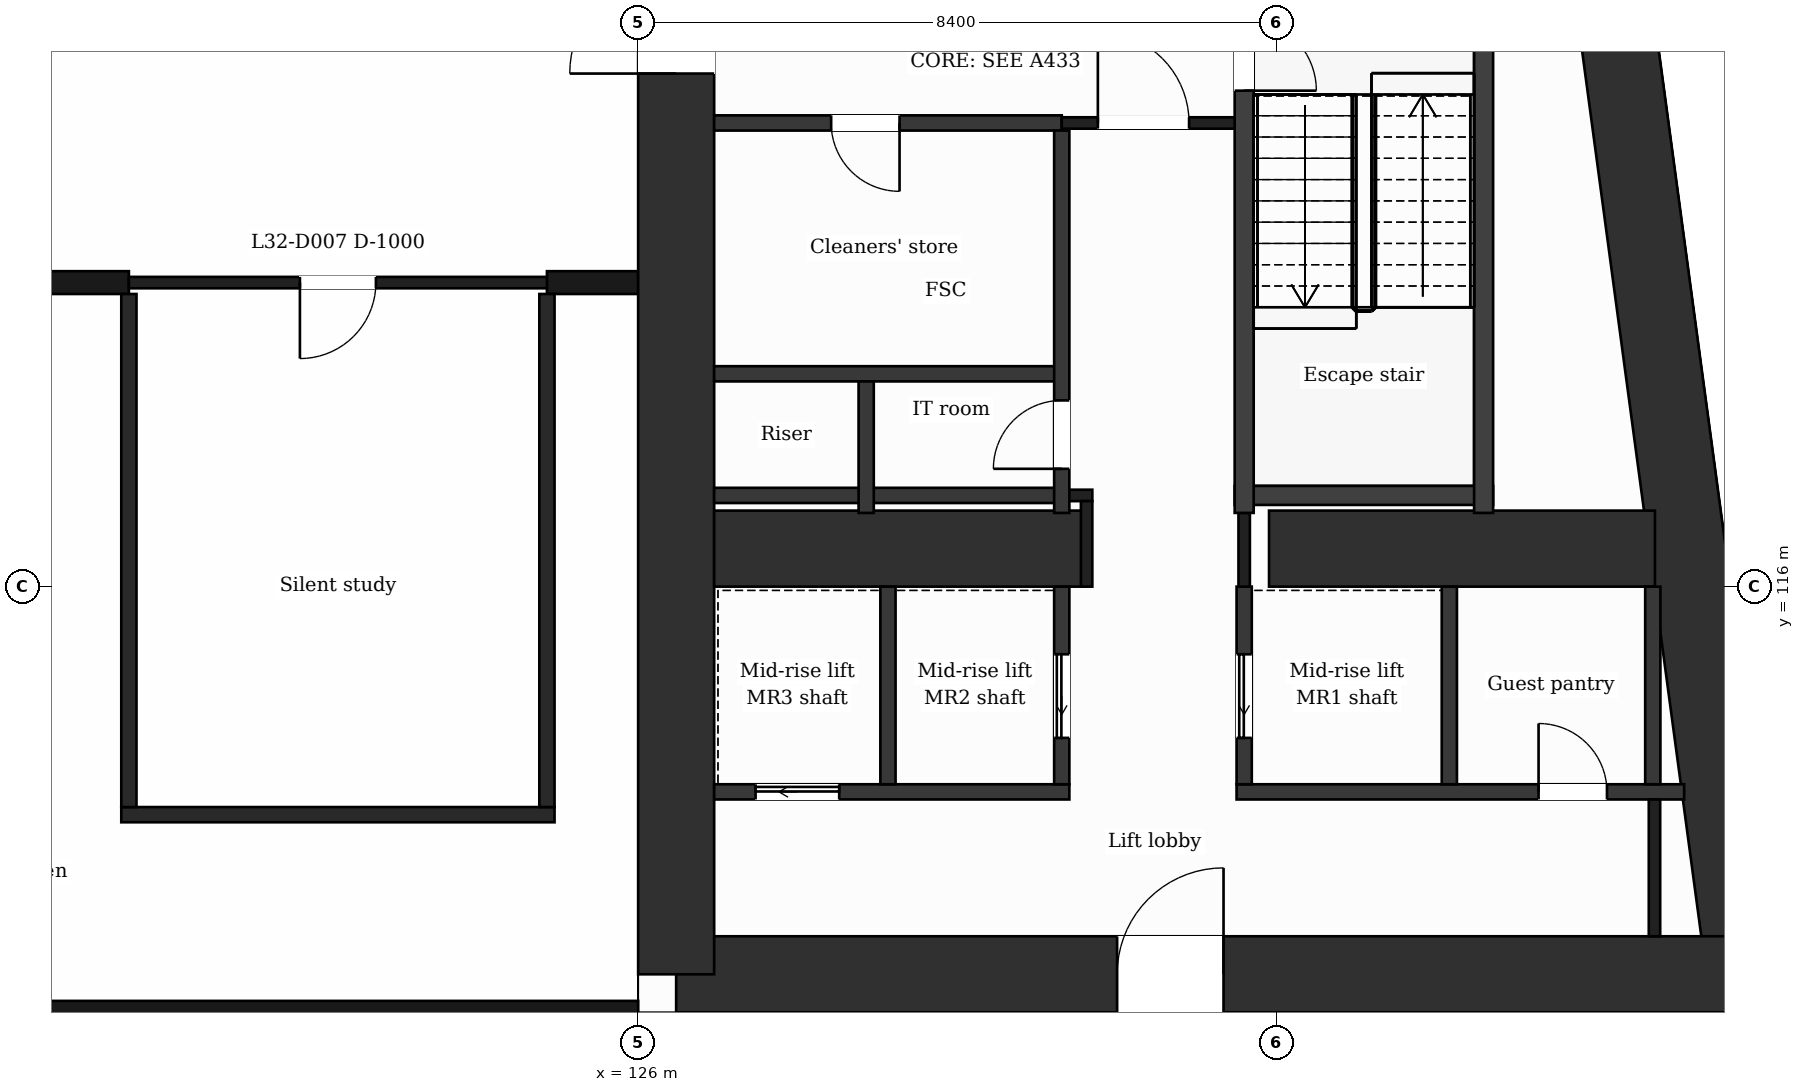
"""IFC4 building model, lengths in metres.
Left out: names, types, materials, properties, quantities, classifications, styles, units other than length and angle.
Written with IfcOpenShell. Run it as: python <this file> out.ifc"""

import sys

from ifc_helpers import new_model, si_unit, direction, frame, frame_2d, origin, place, context, subcontext, project, spatial, rectangle, extrude, element, fill, save


model = new_model("IFC4")
c1 = context("Model", 3, precision=1e-05, world=origin(), true_north=direction((0.0, 1.0)))
c2 = subcontext(c1, "Body", "Model", "MODEL_VIEW")
j1 = project(units=[si_unit("LENGTHUNIT", "METRE"), si_unit("PLANEANGLEUNIT", "RADIAN")], contexts=[c1])
p1 = place(None, origin())
s1 = spatial("IfcSite", under=j1, at=p1, CompositionType="ELEMENT")
p2 = place(p1, origin())
s2 = spatial("IfcBuilding", under=s1, at=p2, CompositionType="ELEMENT")
p3 = place(p2, frame((0.0, 0.0, 135.4)))
s3 = spatial("IfcBuildingStorey", under=s2, at=p3, CompositionType="ELEMENT", Elevation=135.4)
p4 = place(p3, frame((137.732, 131.9, 0.0), z_axis=(0.0, 0.0, 1.0), x_axis=(0.133411141623, -0.991060778808, 0.0)))
e1 = element("IfcWall", 1, at=p4, inside=s3, PredefinedType="SHEAR", context=c2, shape_type="SweptSolid", body=[
    extrude(rectangle(XDim=21.189, YDim=1.0, at=frame_2d((10.595, 0.0))), origin(), (0.0, 0.0, 1.0), 7.4),
])
p5 = place(p3, frame((140.559, 110.9, 0.0), z_axis=(0.0, 0.0, 1.0), x_axis=(-1.0, 0.0, 0.0)))
e2 = element("IfcWall", 2, at=p5, inside=s3, PredefinedType="SHEAR", context=c2, shape_type="SweptSolid", body=[
    extrude(rectangle(XDim=14.059, YDim=1.0, at=frame_2d((7.029, 0.0))), origin(), (0.0, 0.0, 1.0), 7.4),
])
p6 = place(p5, frame((6.858, 0.0, 0.0)))
e3 = element("IfcOpeningElement", 3, at=p6, cuts=e2, PredefinedType="OPENING", context=c2, shape_type="SweptSolid", body=[
    extrude(rectangle(XDim=1.4, YDim=2.1, at=frame_2d((0.7, 1.05))), frame((0.0, 0.51, 0.0), z_axis=(0.0, -1.0, 0.0), x_axis=(1.0, 0.0, 0.0)), (0.0, 0.0, 1.0), 1.02),
])
p7 = place(p3, frame((126.5, 110.9, 0.0), z_axis=(0.0, 0.0, 1.0), x_axis=(0.0, 1.0, 0.0)))
e4 = element("IfcWall", 4, at=p7, inside=s3, PredefinedType="SHEAR", context=c2, shape_type="SweptSolid", body=[
    extrude(rectangle(XDim=21.0, YDim=1.0, at=frame_2d((10.5, 0.0))), origin(), (0.0, 0.0, 1.0), 7.4),
])
p8 = place(p7, frame((11.85, 0.0, 0.0)))
e5 = element("IfcOpeningElement", 5, at=p8, cuts=e4, PredefinedType="OPENING", context=c2, shape_type="SweptSolid", body=[
    extrude(rectangle(XDim=1.4, YDim=2.1, at=frame_2d((0.7, 1.05))), frame((0.0, 0.51, 0.0), z_axis=(0.0, -1.0, 0.0), x_axis=(1.0, 0.0, 0.0)), (0.0, 0.0, 1.0), 1.02),
])
p9 = place(p3, frame((127.0, 116.5, 0.0), z_axis=(0.0, 0.0, 1.0), x_axis=(1.0, 0.0, 0.0)))
e6 = element("IfcWall", 6, at=p9, inside=s3, PredefinedType="SHEAR", context=c2, shape_type="SweptSolid", body=[
    extrude(rectangle(XDim=4.9, YDim=1.0, at=frame_2d((2.45, 0.0))), origin(), (0.0, 0.0, 1.0), 7.4),
])
p10 = place(p3, frame((134.3, 116.5, 0.0), z_axis=(0.0, 0.0, 1.0), x_axis=(1.0, 0.0, 0.0)))
e7 = element("IfcWall", 7, at=p10, inside=s3, PredefinedType="SHEAR", context=c2, shape_type="SweptSolid", body=[
    extrude(rectangle(XDim=5.077, YDim=1.0, at=frame_2d((2.539, 0.0))), origin(), (0.0, 0.0, 1.0), 7.4),
])
p11 = place(p3, frame((100.8, 110.4, 0.0), z_axis=(0.0, 0.0, 1.0), x_axis=(1.0, 0.0, 0.0)))
e8 = element("IfcWall", 8, at=p11, inside=s3, PredefinedType="PARTITIONING", context=c2, shape_type="SweptSolid", body=[
    extrude(rectangle(XDim=25.2, YDim=0.3, at=frame_2d((12.6, 0.0))), origin(), (0.0, 0.0, 1.0), 1.0),
])
p12 = place(p3, frame((119.2, 113.0, 0.0), z_axis=(0.0, 0.0, 1.0), x_axis=(1.0, 0.0, 0.0)))
e9 = element("IfcWall", 9, at=p12, inside=s3, PredefinedType="PARTITIONING", context=c2, shape_type="SweptSolid", body=[
    extrude(rectangle(XDim=5.7, YDim=0.2, at=frame_2d((2.85, 0.0))), origin(), (0.0, 0.0, 1.0), 6.9),
])
p13 = place(p3, frame((127.0, 113.3, 0.0), z_axis=(0.0, 0.0, 1.0), x_axis=(1.0, 0.0, 0.0)))
e10 = element("IfcWall", 10, at=p13, inside=s3, PredefinedType="PARTITIONING", context=c2, shape_type="SweptSolid", body=[
    extrude(rectangle(XDim=4.673, YDim=0.2, at=frame_2d((2.336, 0.0))), origin(), (0.0, 0.0, 1.0), 6.9),
])
p14 = place(p13, frame((0.545, 0.0, 0.0)))
e11 = element("IfcOpeningElement", 11, at=p14, cuts=e10, PredefinedType="OPENING", context=c2, shape_type="SweptSolid", body=[
    extrude(rectangle(XDim=1.1, YDim=2.1, at=frame_2d((0.55, 1.05))), frame((0.0, 0.11, 0.0), z_axis=(0.0, -1.0, 0.0), x_axis=(1.0, 0.0, 0.0)), (0.0, 0.0, 1.0), 0.22),
])
p15 = place(p3, frame((133.873, 113.3, 0.0), z_axis=(0.0, 0.0, 1.0), x_axis=(1.0, 0.0, 0.0)))
e12 = element("IfcWall", 12, at=p15, inside=s3, PredefinedType="PARTITIONING", context=c2, shape_type="SweptSolid", body=[
    extrude(rectangle(XDim=5.888, YDim=0.2, at=frame_2d((2.944, 0.0))), origin(), (0.0, 0.0, 1.0), 6.9),
])
p16 = place(p15, frame((3.973, 0.0, 0.0)))
e13 = element("IfcOpeningElement", 13, at=p16, cuts=e12, PredefinedType="OPENING", context=c2, shape_type="SweptSolid", body=[
    extrude(rectangle(XDim=0.9, YDim=2.1, at=frame_2d((0.45, 1.05))), frame((0.0, 0.11, 0.0), z_axis=(0.0, -1.0, 0.0), x_axis=(1.0, 0.0, 0.0)), (0.0, 0.0, 1.0), 0.22),
])
p17 = place(p3, frame((127.0, 117.2, 0.0), z_axis=(0.0, 0.0, 1.0), x_axis=(1.0, 0.0, 0.0)))
e14 = element("IfcWall", 14, at=p17, inside=s3, PredefinedType="PARTITIONING", context=c2, shape_type="SweptSolid", body=[
    extrude(rectangle(XDim=4.573, YDim=0.2, at=frame_2d((2.287, 0.0))), origin(), (0.0, 0.0, 1.0), 6.9),
])
p18 = place(p3, frame((131.573, 117.2, 0.0), z_axis=(0.0, 0.0, 1.0), x_axis=(1.0, 0.0, 0.0)))
e15 = element("IfcWall", 15, at=p18, inside=s3, PredefinedType="PARTITIONING", context=c2, shape_type="SweptSolid", body=[
    extrude(rectangle(XDim=0.402, YDim=0.15, at=frame_2d((0.201, 0.0))), origin(), (0.0, 0.0, 1.0), 6.9),
])
p19 = place(p3, frame((133.848, 117.2, 0.0), z_axis=(0.0, 0.0, 1.0), x_axis=(1.0, 0.0, 0.0)))
e16 = element("IfcWall", 16, at=p19, inside=s3, PredefinedType="PARTITIONING", context=c2, shape_type="SweptSolid", body=[
    extrude(rectangle(XDim=3.4, YDim=0.25, at=frame_2d((1.7, 0.0))), origin(), (0.0, 0.0, 1.0), 6.9),
])
p20 = place(p3, frame((127.0, 118.8, 0.0), z_axis=(0.0, 0.0, 1.0), x_axis=(1.0, 0.0, 0.0)))
e17 = element("IfcWall", 17, at=p20, inside=s3, PredefinedType="PARTITIONING", context=c2, shape_type="SweptSolid", body=[
    extrude(rectangle(XDim=4.573, YDim=0.2, at=frame_2d((2.287, 0.0))), origin(), (0.0, 0.0, 1.0), 6.9),
])
p21 = place(p3, frame((115.9, 120.0, 0.0), z_axis=(0.0, 0.0, 1.0), x_axis=(1.0, 0.0, 0.0)))
e18 = element("IfcWall", 18, at=p21, inside=s3, PredefinedType="PARTITIONING", context=c2, shape_type="SweptSolid", body=[
    extrude(rectangle(XDim=3.4, YDim=0.3, at=frame_2d((1.7, 0.0))), origin(), (0.0, 0.0, 1.0), 1.0),
])
p22 = place(p3, frame((124.8, 120.0, 0.0), z_axis=(0.0, 0.0, 1.0), x_axis=(1.0, 0.0, 0.0)))
e19 = element("IfcWall", 19, at=p22, inside=s3, PredefinedType="PARTITIONING", context=c2, shape_type="SweptSolid", body=[
    extrude(rectangle(XDim=1.2, YDim=0.3, at=frame_2d((0.6, 0.0))), origin(), (0.0, 0.0, 1.0), 1.0),
])
p23 = place(p3, frame((119.3, 120.0, 0.0), z_axis=(0.0, 0.0, 1.0), x_axis=(1.0, 0.0, 0.0)))
e20 = element("IfcWall", 20, at=p23, inside=s3, PredefinedType="PARTITIONING", context=c2, shape_type="SweptSolid", body=[
    extrude(rectangle(XDim=5.5, YDim=0.15, at=frame_2d((2.75, 0.0))), origin(), (0.0, 0.0, 1.0), 6.9),
])
p24 = place(p23, frame((2.25, 0.0, 0.0)))
e21 = element("IfcOpeningElement", 21, at=p24, cuts=e20, PredefinedType="OPENING", context=c2, shape_type="SweptSolid", body=[
    extrude(rectangle(XDim=1.0, YDim=2.1, at=frame_2d((0.5, 1.05))), frame((0.0, 0.085, 0.0), z_axis=(0.0, -1.0, 0.0), x_axis=(1.0, 0.0, 0.0)), (0.0, 0.0, 1.0), 0.17),
])
p25 = place(p3, frame((127.0, 122.1, 0.0), z_axis=(0.0, 0.0, 1.0), x_axis=(1.0, 0.0, 0.0)))
e22 = element("IfcWall", 22, at=p25, inside=s3, PredefinedType="PARTITIONING", context=c2, shape_type="SweptSolid", body=[
    extrude(rectangle(XDim=4.573, YDim=0.2, at=frame_2d((2.287, 0.0))), origin(), (0.0, 0.0, 1.0), 6.9),
])
p26 = place(p25, frame((1.539, 0.0, 0.0)))
e23 = element("IfcOpeningElement", 23, at=p26, cuts=e22, PredefinedType="OPENING", context=c2, shape_type="SweptSolid", body=[
    extrude(rectangle(XDim=0.9, YDim=2.1, at=frame_2d((0.45, 1.05))), frame((0.0, 0.11, 0.0), z_axis=(0.0, -1.0, 0.0), x_axis=(1.0, 0.0, 0.0)), (0.0, 0.0, 1.0), 0.22),
])
p27 = place(p3, frame((131.573, 122.1, 0.0), z_axis=(0.0, 0.0, 1.0), x_axis=(1.0, 0.0, 0.0)))
e24 = element("IfcWall", 24, at=p27, inside=s3, PredefinedType="PARTITIONING", context=c2, shape_type="SweptSolid", body=[
    extrude(rectangle(XDim=2.4, YDim=0.15, at=frame_2d((1.2, 0.0))), origin(), (0.0, 0.0, 1.0), 6.9),
])
p28 = place(p27, frame((0.475, 0.0, 0.0)))
e25 = element("IfcOpeningElement", 25, at=p28, cuts=e24, PredefinedType="OPENING", context=c2, shape_type="SweptSolid", body=[
    extrude(rectangle(XDim=1.2, YDim=2.1, at=frame_2d((0.6, 1.05))), frame((0.0, 0.085, 0.0), z_axis=(0.0, -1.0, 0.0), x_axis=(1.0, 0.0, 0.0)), (0.0, 0.0, 1.0), 0.17),
])
for number, where, z_axis, x_axis in (
    (26, (119.3, 113.1, 0.0), (0.0, 0.0, 1.0), (0.0, 1.0, 0.0)),
    (27, (124.8, 113.1, 0.0), (0.0, 0.0, 1.0), (0.0, 1.0, 0.0)),
):
    element("IfcWall", number, at=place(p3, frame(where, z_axis=z_axis, x_axis=x_axis)), inside=s3, PredefinedType="PARTITIONING", context=c2, shape_type="SweptSolid", body=[
        extrude(rectangle(XDim=6.75, YDim=0.2, at=frame_2d((3.375, 0.0))), origin(), (0.0, 0.0, 1.0), 6.9),
    ])
p29 = place(p3, frame((129.0, 116.97, 0.0), z_axis=(0.0, 0.0, 1.0), x_axis=(0.0, 1.0, 0.0)))
e28 = element("IfcWall", 28, at=p29, inside=s3, PredefinedType="PARTITIONING", context=c2, shape_type="SweptSolid", body=[
    extrude(rectangle(XDim=1.73, YDim=0.2, at=frame_2d((0.865, 0.0))), origin(), (0.0, 0.0, 1.0), 6.9),
])
p30 = place(p3, frame((129.287, 113.4, 0.0), z_axis=(0.0, 0.0, 1.0), x_axis=(0.0, 1.0, 0.0)))
e29 = element("IfcWall", 29, at=p30, inside=s3, PredefinedType="PARTITIONING", context=c2, shape_type="SweptSolid", body=[
    extrude(rectangle(XDim=2.6, YDim=0.2, at=frame_2d((1.3, 0.0))), origin(), (0.0, 0.0, 1.0), 6.9),
])
p31 = place(p3, frame((131.573, 113.4, 0.0), z_axis=(0.0, 0.0, 1.0), x_axis=(0.0, 1.0, 0.0)))
e30 = element("IfcWall", 30, at=p31, inside=s3, PredefinedType="PARTITIONING", context=c2, shape_type="SweptSolid", body=[
    extrude(rectangle(XDim=2.6, YDim=0.2, at=frame_2d((1.3, 0.0))), origin(), (0.0, 0.0, 1.0), 6.9),
])
p32 = place(p31, frame((0.61, 0.0, 0.0)))
e31 = element("IfcOpeningElement", 31, at=p32, cuts=e30, PredefinedType="OPENING", context=c2, shape_type="SweptSolid", body=[
    extrude(rectangle(XDim=1.1, YDim=2.1, at=frame_2d((0.55, 1.05))), frame((0.0, 0.11, 0.0), z_axis=(0.0, -1.0, 0.0), x_axis=(1.0, 0.0, 0.0)), (0.0, 0.0, 1.0), 0.22),
])
p33 = place(p3, frame((131.573, 116.97, 0.0), z_axis=(0.0, 0.0, 1.0), x_axis=(0.0, 1.0, 0.0)))
e32 = element("IfcWall", 32, at=p33, inside=s3, PredefinedType="PARTITIONING", context=c2, shape_type="SweptSolid", body=[
    extrude(rectangle(XDim=5.03, YDim=0.2, at=frame_2d((2.515, 0.0))), origin(), (0.0, 0.0, 1.0), 6.9),
])
p34 = place(p33, frame((0.58, 0.0, 0.0)))
e33 = element("IfcOpeningElement", 33, at=p34, cuts=e32, PredefinedType="OPENING", context=c2, shape_type="SweptSolid", body=[
    extrude(rectangle(XDim=0.9, YDim=2.1, at=frame_2d((0.45, 1.05))), frame((0.0, 0.11, 0.0), z_axis=(0.0, -1.0, 0.0), x_axis=(1.0, 0.0, 0.0)), (0.0, 0.0, 1.0), 0.22),
])
p35 = place(p3, frame((131.9, 116.0, 0.0), z_axis=(0.0, 0.0, 1.0), x_axis=(0.0, 1.0, 0.0)))
e34 = element("IfcWall", 34, at=p35, inside=s3, PredefinedType="PARTITIONING", context=c2, shape_type="SweptSolid", body=[
    extrude(rectangle(XDim=1.125, YDim=0.15, at=frame_2d((0.562, 0.0))), origin(), (0.0, 0.0, 1.0), 6.9),
])
p36 = place(p3, frame((133.973, 113.4, 0.0), z_axis=(0.0, 0.0, 1.0), x_axis=(0.0, 1.0, 0.0)))
e35 = element("IfcWall", 35, at=p36, inside=s3, PredefinedType="PARTITIONING", context=c2, shape_type="SweptSolid", body=[
    extrude(rectangle(XDim=2.6, YDim=0.2, at=frame_2d((1.3, 0.0))), origin(), (0.0, 0.0, 1.0), 6.9),
])
p37 = place(p36, frame((0.61, 0.0, 0.0)))
e36 = element("IfcOpeningElement", 36, at=p37, cuts=e35, PredefinedType="OPENING", context=c2, shape_type="SweptSolid", body=[
    extrude(rectangle(XDim=1.1, YDim=2.1, at=frame_2d((0.55, 1.05))), frame((0.0, 0.11, 0.0), z_axis=(0.0, -1.0, 0.0), x_axis=(1.0, 0.0, 0.0)), (0.0, 0.0, 1.0), 0.22),
])
p38 = place(p3, frame((133.973, 116.0, 0.0), z_axis=(0.0, 0.0, 1.0), x_axis=(0.0, 1.0, 0.0)))
e37 = element("IfcWall", 37, at=p38, inside=s3, PredefinedType="PARTITIONING", context=c2, shape_type="SweptSolid", body=[
    extrude(rectangle(XDim=0.97, YDim=0.15, at=frame_2d((0.485, 0.0))), origin(), (0.0, 0.0, 1.0), 6.9),
])
p39 = place(p3, frame((133.973, 116.97, 0.0), z_axis=(0.0, 0.0, 1.0), x_axis=(0.0, 1.0, 0.0)))
e38 = element("IfcWall", 38, at=p39, inside=s3, PredefinedType="PARTITIONING", context=c2, shape_type="SweptSolid", body=[
    extrude(rectangle(XDim=6.855, YDim=0.25, at=frame_2d((3.427, 0.0))), origin(), (0.0, 0.0, 1.0), 6.9),
])
p40 = place(p39, frame((5.555, 0.0, 0.0)))
e39 = element("IfcOpeningElement", 39, at=p40, cuts=e38, PredefinedType="OPENING", context=c2, shape_type="SweptSolid", body=[
    extrude(rectangle(XDim=0.95, YDim=2.1, at=frame_2d((0.475, 1.05))), frame((0.0, 0.135, 0.0), z_axis=(0.0, -1.0, 0.0), x_axis=(1.0, 0.0, 0.0)), (0.0, 0.0, 1.0), 0.27),
])
p41 = place(p3, frame((136.672, 113.4, 0.0), z_axis=(0.0, 0.0, 1.0), x_axis=(0.0, 1.0, 0.0)))
e40 = element("IfcWall", 40, at=p41, inside=s3, PredefinedType="PARTITIONING", context=c2, shape_type="SweptSolid", body=[
    extrude(rectangle(XDim=2.6, YDim=0.2, at=frame_2d((1.3, 0.0))), origin(), (0.0, 0.0, 1.0), 6.9),
])
p42 = place(p3, frame((137.123, 116.97, 0.0), z_axis=(0.0, 0.0, 1.0), x_axis=(0.0, 1.0, 0.0)))
e41 = element("IfcWall", 41, at=p42, inside=s3, PredefinedType="PARTITIONING", context=c2, shape_type="SweptSolid", body=[
    extrude(rectangle(XDim=6.855, YDim=0.25, at=frame_2d((3.427, 0.0))), origin(), (0.0, 0.0, 1.0), 6.9),
])
p43 = place(p3, frame((139.349, 113.4, 0.0), z_axis=(0.0, 0.0, 1.0), x_axis=(0.0, 1.0, 0.0)))
e42 = element("IfcWall", 42, at=p43, inside=s3, PredefinedType="PARTITIONING", context=c2, shape_type="SweptSolid", body=[
    extrude(rectangle(XDim=2.6, YDim=0.2, at=frame_2d((1.3, 0.0))), origin(), (0.0, 0.0, 1.0), 6.9),
])
p44 = place(p3, frame((139.371, 111.4, 0.0), z_axis=(0.0, 0.0, 1.0), x_axis=(0.0, 1.0, 0.0)))
e43 = element("IfcWall", 43, at=p44, inside=s3, PredefinedType="PARTITIONING", context=c2, shape_type="SweptSolid", body=[
    extrude(rectangle(XDim=1.8, YDim=0.15, at=frame_2d((0.9, 0.0))), origin(), (0.0, 0.0, 1.0), 6.9),
])
p45 = place(p24, origin())
e44 = element("IfcDoor", 44, at=p45, inside=s3, OperationType="SINGLE_SWING_LEFT", PredefinedType="DOOR", context=c2, shape_type="SweptSolid", body=[
    extrude(rectangle(XDim=1.0, YDim=2.1, at=frame_2d((0.5, 1.05))), frame((0.0, 0.025, 0.0), z_axis=(0.0, -1.0, 0.0), x_axis=(1.0, 0.0, 0.0)), (0.0, 0.0, 1.0), 0.05),
])
fill(e21, e44)
p46 = place(p28, origin())
e45 = element("IfcDoor", 45, at=p46, inside=s3, OperationType="SINGLE_SWING_LEFT", PredefinedType="DOOR", context=c2, shape_type="SweptSolid", body=[
    extrude(rectangle(XDim=1.2, YDim=2.1, at=frame_2d((0.6, 1.05))), frame((0.0, 0.025, 0.0), z_axis=(0.0, -1.0, 0.0), x_axis=(1.0, 0.0, 0.0)), (0.0, 0.0, 1.0), 0.05),
])
fill(e25, e45)
p47 = place(p26, origin())
e46 = element("IfcDoor", 46, at=p47, inside=s3, OperationType="SINGLE_SWING_RIGHT", PredefinedType="DOOR", context=c2, shape_type="SweptSolid", body=[
    extrude(rectangle(XDim=0.9, YDim=2.1, at=frame_2d((0.45, 1.05))), frame((0.0, 0.025, 0.0), z_axis=(0.0, -1.0, 0.0), x_axis=(1.0, 0.0, 0.0)), (0.0, 0.0, 1.0), 0.05),
])
fill(e23, e46)
p48 = place(p40, origin())
e47 = element("IfcDoor", 47, at=p48, inside=s3, OperationType="SINGLE_SWING_LEFT", PredefinedType="DOOR", context=c2, shape_type="SweptSolid", body=[
    extrude(rectangle(XDim=0.95, YDim=2.1, at=frame_2d((0.475, 1.05))), frame((0.0, 0.025, 0.0), z_axis=(0.0, -1.0, 0.0), x_axis=(1.0, 0.0, 0.0)), (0.0, 0.0, 1.0), 0.05),
])
fill(e39, e47)
p49 = place(p34, origin())
e48 = element("IfcDoor", 48, at=p49, inside=s3, OperationType="SINGLE_SWING_LEFT", PredefinedType="DOOR", context=c2, shape_type="SweptSolid", body=[
    extrude(rectangle(XDim=0.9, YDim=2.1, at=frame_2d((0.45, 1.05))), frame((0.0, 0.025, 0.0), z_axis=(0.0, -1.0, 0.0), x_axis=(1.0, 0.0, 0.0)), (0.0, 0.0, 1.0), 0.05),
])
fill(e33, e48)
p50 = place(p37, origin())
e49 = element("IfcDoor", 49, at=p50, inside=s3, OperationType="SLIDING_TO_LEFT", PredefinedType="DOOR", context=c2, shape_type="SweptSolid", body=[
    extrude(rectangle(XDim=1.1, YDim=2.1, at=frame_2d((0.55, 1.05))), frame((0.0, 0.025, 0.0), z_axis=(0.0, -1.0, 0.0), x_axis=(1.0, 0.0, 0.0)), (0.0, 0.0, 1.0), 0.05),
])
fill(e36, e49)
p51 = place(p32, origin())
e50 = element("IfcDoor", 50, at=p51, inside=s3, OperationType="SLIDING_TO_LEFT", PredefinedType="DOOR", context=c2, shape_type="SweptSolid", body=[
    extrude(rectangle(XDim=1.1, YDim=2.1, at=frame_2d((0.55, 1.05))), frame((0.0, 0.025, 0.0), z_axis=(0.0, -1.0, 0.0), x_axis=(1.0, 0.0, 0.0)), (0.0, 0.0, 1.0), 0.05),
])
fill(e31, e50)
p52 = place(p14, origin())
e51 = element("IfcDoor", 51, at=p52, inside=s3, OperationType="SLIDING_TO_LEFT", PredefinedType="DOOR", context=c2, shape_type="SweptSolid", body=[
    extrude(rectangle(XDim=1.1, YDim=2.1, at=frame_2d((0.55, 1.05))), frame((0.0, 0.025, 0.0), z_axis=(0.0, -1.0, 0.0), x_axis=(1.0, 0.0, 0.0)), (0.0, 0.0, 1.0), 0.05),
])
fill(e11, e51)
p53 = place(p16, origin())
e52 = element("IfcDoor", 52, at=p53, inside=s3, OperationType="SINGLE_SWING_LEFT", PredefinedType="DOOR", context=c2, shape_type="SweptSolid", body=[
    extrude(rectangle(XDim=0.9, YDim=2.1, at=frame_2d((0.45, 1.05))), frame((0.0, 0.025, 0.0), z_axis=(0.0, -1.0, 0.0), x_axis=(1.0, 0.0, 0.0)), (0.0, 0.0, 1.0), 0.05),
])
fill(e13, e52)
p54 = place(p6, origin())
e53 = element("IfcDoor", 53, at=p54, inside=s3, OperationType="SINGLE_SWING_LEFT", PredefinedType="DOOR", context=c2, shape_type="SweptSolid", body=[
    extrude(rectangle(XDim=1.4, YDim=2.1, at=frame_2d((0.7, 1.05))), frame((0.0, 0.025, 0.0), z_axis=(0.0, -1.0, 0.0), x_axis=(1.0, 0.0, 0.0)), (0.0, 0.0, 1.0), 0.05),
])
fill(e3, e53)
p55 = place(p8, origin())
e54 = element("IfcDoor", 54, at=p55, inside=s3, OperationType="SINGLE_SWING_LEFT", PredefinedType="DOOR", context=c2, shape_type="SweptSolid", body=[
    extrude(rectangle(XDim=1.4, YDim=2.1, at=frame_2d((0.7, 1.05))), frame((0.0, 0.025, 0.0), z_axis=(0.0, -1.0, 0.0), x_axis=(1.0, 0.0, 0.0)), (0.0, 0.0, 1.0), 0.05),
])
fill(e5, e54)
save(model, sys.argv[1])
